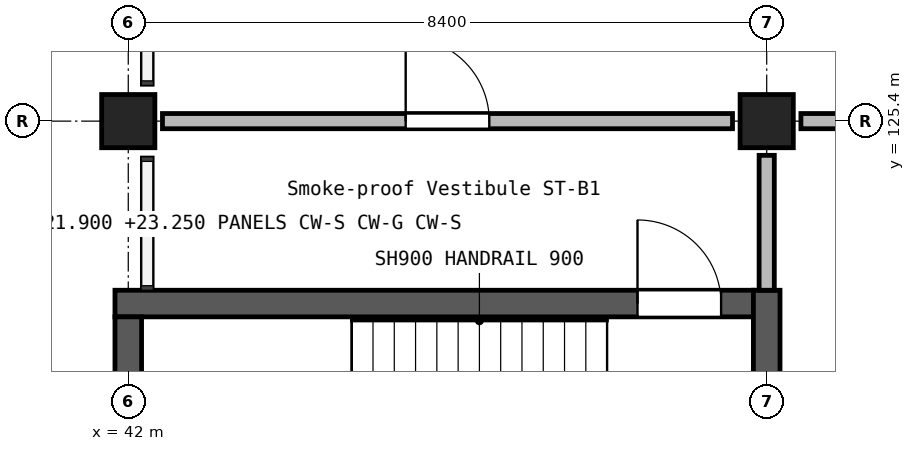
"""IFC4 building model, lengths in metres.
Left out: names, types, materials, properties, quantities, classifications, styles, units other than length and angle.
Written with IfcOpenShell. Run it as: python <this file> out.ifc"""

import sys

from ifc_helpers import new_model, si_unit, direction, frame, frame_2d, origin, origin_2d, place, context, subcontext, project, spatial, rectangle, extrude, element, fill, save


model = new_model("IFC4")
c1 = context("Model", 3, precision=1e-05, world=origin(), true_north=direction((0.0, 1.0)))
c2 = subcontext(c1, "Body", "Model", "MODEL_VIEW")
j1 = project(units=[si_unit("LENGTHUNIT", "METRE"), si_unit("PLANEANGLEUNIT", "RADIAN")], contexts=[c1])
p1 = place(None, origin())
s1 = spatial("IfcSite", under=j1, at=p1, CompositionType="ELEMENT")
p2 = place(p1, origin())
s2 = spatial("IfcBuilding", under=s1, at=p2, CompositionType="ELEMENT")
p3 = place(p2, frame((0.0, 0.0, 21.0)))
s3 = spatial("IfcBuildingStorey", under=s2, at=p3, CompositionType="ELEMENT", Elevation=21.0)
for number, where, z_axis, x_axis in (
    (1, (42.0, 125.4, 0.0), (0.0, 0.0, 1.0), (1.0, 0.0, 0.0)),
    (2, (50.4, 125.4, 0.0), (0.0, 0.0, 1.0), (1.0, 0.0, 0.0)),
):
    element("IfcColumn", number, at=place(p3, frame(where, z_axis=z_axis, x_axis=x_axis)), inside=s3, PredefinedType="COLUMN", context=c2, shape_type="SweptSolid", body=[
        extrude(rectangle(XDim=0.7, YDim=0.7, at=origin_2d()), origin(), (0.0, 0.0, 1.0), 3.9),
    ])
p4 = place(p3, frame((41.825, 123.0, 0.0), z_axis=(0.0, 0.0, 1.0), x_axis=(1.0, 0.0, 0.0)))
e3 = element("IfcWall", 3, at=p4, inside=s3, PredefinedType="SHEAR", context=c2, shape_type="SweptSolid", body=[
    extrude(rectangle(XDim=8.4, YDim=0.35, at=frame_2d((4.2, 0.0))), origin(), (0.0, 0.0, 1.0), 3.9),
])
p5 = place(p4, frame((6.875, 0.0, 0.0)))
e4 = element("IfcOpeningElement", 4, at=p5, cuts=e3, PredefinedType="OPENING", context=c2, shape_type="SweptSolid", body=[
    extrude(rectangle(XDim=1.1, YDim=2.1, at=frame_2d((0.55, 1.05))), frame((0.0, 0.185, 0.0), z_axis=(0.0, -1.0, 0.0), x_axis=(1.0, 0.0, 0.0)), (0.0, 0.0, 1.0), 0.37),
])
p6 = place(p3, frame((42.0, 117.425, 0.0), z_axis=(0.0, 0.0, 1.0), x_axis=(0.0, 1.0, 0.0)))
e5 = element("IfcWall", 5, at=p6, inside=s3, PredefinedType="SHEAR", context=c2, shape_type="SweptSolid", body=[
    extrude(rectangle(XDim=5.4, YDim=0.35, at=frame_2d((2.7, 0.0))), origin(), (0.0, 0.0, 1.0), 3.9),
])
p7 = place(p3, frame((50.4, 117.425, 0.0), z_axis=(0.0, 0.0, 1.0), x_axis=(0.0, 1.0, 0.0)))
e6 = element("IfcWall", 6, at=p7, inside=s3, PredefinedType="SHEAR", context=c2, shape_type="SweptSolid", body=[
    extrude(rectangle(XDim=5.75, YDim=0.35, at=frame_2d((2.875, 0.0))), origin(), (0.0, 0.0, 1.0), 3.9),
])
p8 = place(p3, frame((42.45, 125.4, 0.0), z_axis=(0.0, 0.0, 1.0), x_axis=(1.0, 0.0, 0.0)))
e7 = element("IfcWall", 7, at=p8, inside=s3, PredefinedType="SOLIDWALL", context=c2, shape_type="SweptSolid", body=[
    extrude(rectangle(XDim=7.5, YDim=0.2, at=frame_2d((3.75, 0.0))), origin(), (0.0, 0.0, 1.0), 3.6),
])
p9 = place(p8, frame((3.2, 0.0, 0.0)))
e8 = element("IfcOpeningElement", 8, at=p9, cuts=e7, PredefinedType="OPENING", context=c2, shape_type="SweptSolid", body=[
    extrude(rectangle(XDim=1.1, YDim=2.1, at=frame_2d((0.55, 1.05))), frame((0.0, 0.11, 0.0), z_axis=(0.0, -1.0, 0.0), x_axis=(1.0, 0.0, 0.0)), (0.0, 0.0, 1.0), 0.22),
])
p10 = place(p3, frame((50.85, 125.4, 0.0), z_axis=(0.0, 0.0, 1.0), x_axis=(1.0, 0.0, 0.0)))
e9 = element("IfcWall", 9, at=p10, inside=s3, PredefinedType="SOLIDWALL", context=c2, shape_type="SweptSolid", body=[
    extrude(rectangle(XDim=3.85, YDim=0.2, at=frame_2d((1.925, 0.0))), origin(), (0.0, 0.0, 1.0), 3.6),
])
p11 = place(p10, frame((1.15, 0.0, 0.0)))
e10 = element("IfcOpeningElement", 10, at=p11, cuts=e9, PredefinedType="OPENING", context=c2, shape_type="SweptSolid", body=[
    extrude(rectangle(XDim=1.0, YDim=2.1, at=frame_2d((0.5, 1.05))), frame((0.0, 0.11, 0.0), z_axis=(0.0, -1.0, 0.0), x_axis=(1.0, 0.0, 0.0)), (0.0, 0.0, 1.0), 0.22),
])
p12 = place(p3, frame((50.4, 123.175, 0.0), z_axis=(0.0, 0.0, 1.0), x_axis=(0.0, 1.0, 0.0)))
e11 = element("IfcWall", 11, at=p12, inside=s3, PredefinedType="SOLIDWALL", context=c2, shape_type="SweptSolid", body=[
    extrude(rectangle(XDim=1.775, YDim=0.2, at=frame_2d((0.887, 0.0))), origin(), (0.0, 0.0, 1.0), 3.6),
])
p13 = place(p5, frame((1.1, 0.0, 0.0), z_axis=(0.0, 0.0, 1.0), x_axis=(-1.0, 0.0, 0.0)))
e12 = element("IfcDoor", 12, at=p13, inside=s3, OperationType="SINGLE_SWING_LEFT", PredefinedType="DOOR", context=c2, shape_type="SweptSolid", body=[
    extrude(rectangle(XDim=1.1, YDim=2.1, at=frame_2d((0.55, 1.05))), frame((0.0, 0.025, 0.0), z_axis=(0.0, -1.0, 0.0), x_axis=(1.0, 0.0, 0.0)), (0.0, 0.0, 1.0), 0.05),
])
fill(e4, e12)
p14 = place(p9, frame((1.1, 0.0, 0.0), z_axis=(0.0, 0.0, 1.0), x_axis=(-1.0, 0.0, 0.0)))
e13 = element("IfcDoor", 13, at=p14, inside=s3, OperationType="SINGLE_SWING_LEFT", PredefinedType="DOOR", context=c2, shape_type="SweptSolid", body=[
    extrude(rectangle(XDim=1.1, YDim=2.1, at=frame_2d((0.55, 1.05))), frame((0.0, 0.025, 0.0), z_axis=(0.0, -1.0, 0.0), x_axis=(1.0, 0.0, 0.0)), (0.0, 0.0, 1.0), 0.05),
])
fill(e8, e13)
save(model, sys.argv[1])
